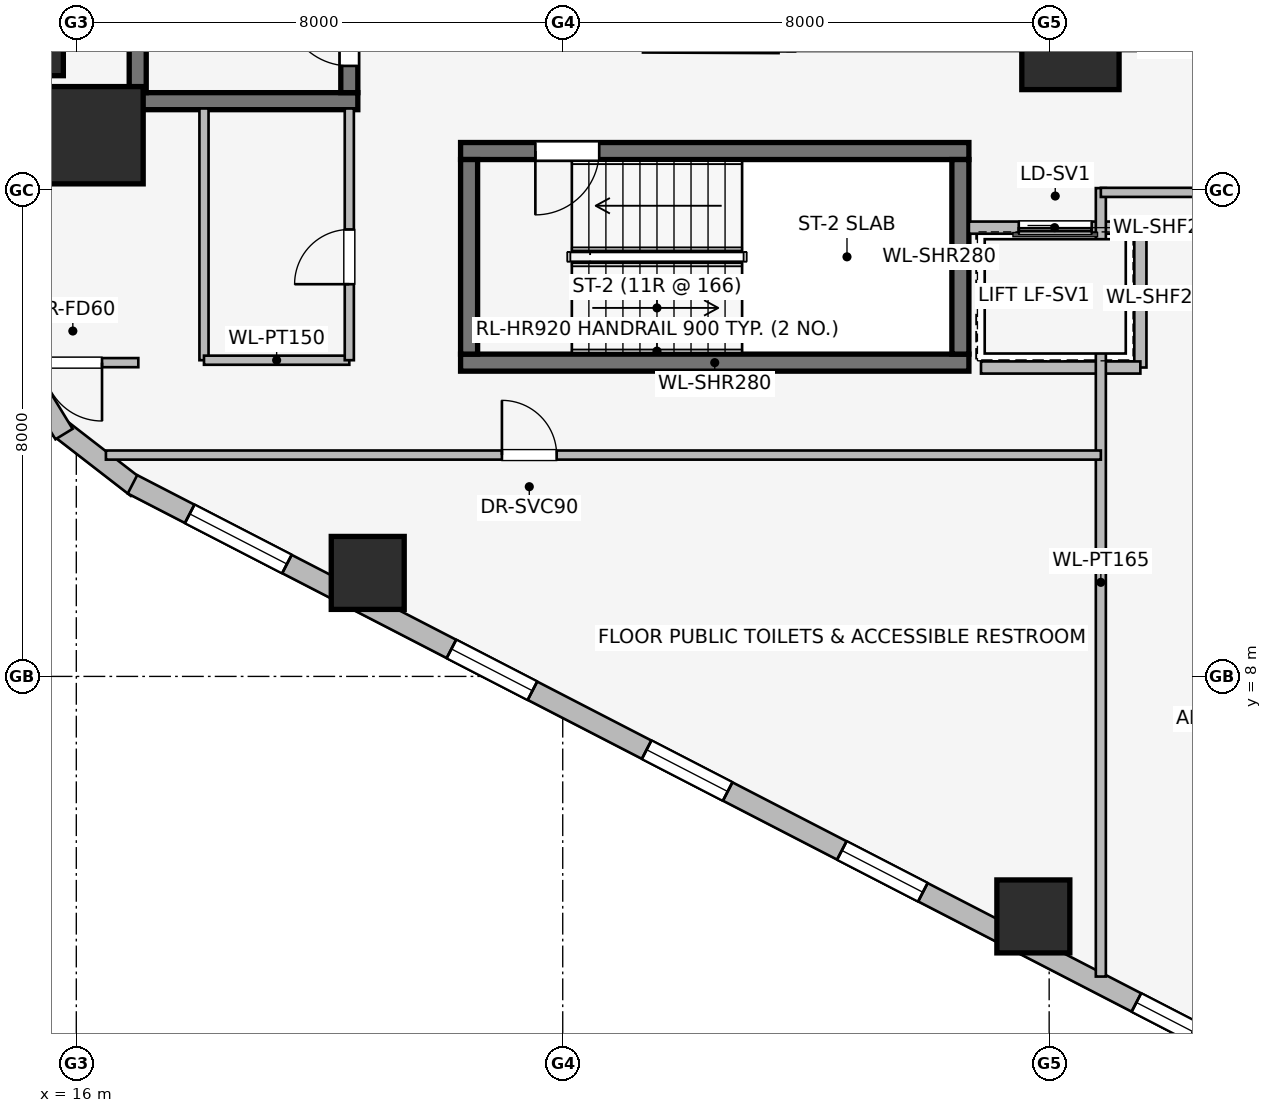
"""IFC4 building model, lengths in metres.
Left out: names, types, materials, properties, quantities, classifications, styles, units other than length and angle.
Written with IfcOpenShell. Run it as: python <this file> out.ifc"""

import sys

from ifc_helpers import new_model, si_unit, direction, frame, frame_2d, origin, origin_2d, place, context, subcontext, project, spatial, rectangle, extrude, element, fill, save


model = new_model("IFC4")
c1 = context("Model", 3, precision=1e-05, world=origin(), true_north=direction((0.0, 1.0)))
c2 = subcontext(c1, "Body", "Model", "MODEL_VIEW")
j1 = project(units=[si_unit("LENGTHUNIT", "METRE"), si_unit("PLANEANGLEUNIT", "RADIAN")], contexts=[c1])
p1 = place(None, origin())
s1 = spatial("IfcSite", under=j1, at=p1, CompositionType="ELEMENT")
p2 = place(p1, origin())
s2 = spatial("IfcBuilding", under=s1, at=p2, CompositionType="ELEMENT")
p3 = place(p2, frame((0.0, 0.0, 63.5)))
s3 = spatial("IfcBuildingStorey", under=s2, at=p3, CompositionType="ELEMENT", Elevation=63.5)
p4 = place(p3, frame((16.87, 17.46, 0.0), z_axis=(0.0, 0.0, 1.0), x_axis=(1.0, 0.0, 0.0)))
e1 = element("IfcWall", 1, at=p4, inside=s3, PredefinedType="SHEAR", context=c2, shape_type="SweptSolid", body=[
    extrude(rectangle(XDim=3.76, YDim=0.28, at=frame_2d((1.88, 0.0))), origin(), (0.0, 0.0, 1.0), 3.65),
])
p5 = place(p3, frame((17.01, 25.4, 0.0), z_axis=(0.0, 0.0, 1.0), x_axis=(0.0, -1.0, 0.0)))
e2 = element("IfcWall", 2, at=p5, inside=s3, PredefinedType="SHEAR", context=c2, shape_type="SweptSolid", body=[
    extrude(rectangle(XDim=7.8, YDim=0.28, at=frame_2d((3.9, 0.0))), origin(), (0.0, 0.0, 1.0), 3.65),
])
p6 = place(p3, frame((20.49, 17.6, 0.0), z_axis=(0.0, 0.0, 1.0), x_axis=(0.0, 1.0, 0.0)))
e3 = element("IfcWall", 3, at=p6, inside=s3, PredefinedType="SHEAR", context=c2, shape_type="SweptSolid", body=[
    extrude(rectangle(XDim=7.8, YDim=0.28, at=frame_2d((3.9, 0.0))), origin(), (0.0, 0.0, 1.0), 3.65),
])
p7 = place(p6, frame((0.44, 0.0, 0.0)))
e4 = element("IfcOpeningElement", 4, at=p7, cuts=e3, PredefinedType="OPENING", context=c2, shape_type="SweptSolid", body=[
    extrude(rectangle(XDim=1.05, YDim=2.0, at=frame_2d((0.525, 1.0))), frame((0.0, 0.15, 0.0), z_axis=(0.0, -1.0, 0.0), x_axis=(1.0, 0.0, 0.0)), (0.0, 0.0, 1.0), 0.3),
])
p8 = place(p3, frame((22.32, 13.16, 0.0), z_axis=(0.0, 0.0, 1.0), x_axis=(1.0, 0.0, 0.0)))
e5 = element("IfcWall", 5, at=p8, inside=s3, PredefinedType="SHEAR", context=c2, shape_type="SweptSolid", body=[
    extrude(rectangle(XDim=8.36, YDim=0.28, at=frame_2d((4.18, 0.0))), origin(), (0.0, 0.0, 1.0), 3.65),
])
p9 = place(p3, frame((30.68, 16.64, 0.0), z_axis=(0.0, 0.0, 1.0), x_axis=(-1.0, 0.0, 0.0)))
e6 = element("IfcWall", 6, at=p9, inside=s3, PredefinedType="SHEAR", context=c2, shape_type="SweptSolid", body=[
    extrude(rectangle(XDim=8.36, YDim=0.28, at=frame_2d((4.18, 0.0))), origin(), (0.0, 0.0, 1.0), 3.65),
])
p10 = place(p9, frame((6.08, 0.0, 0.0)))
e7 = element("IfcOpeningElement", 7, at=p10, cuts=e6, PredefinedType="OPENING", context=c2, shape_type="SweptSolid", body=[
    extrude(rectangle(XDim=1.05, YDim=2.0, at=frame_2d((0.525, 1.0))), frame((0.0, 0.15, 0.0), z_axis=(0.0, -1.0, 0.0), x_axis=(1.0, 0.0, 0.0)), (0.0, 0.0, 1.0), 0.3),
])
for number, where, z_axis, x_axis in (
    (8, (22.46, 16.5, 0.0), (0.0, 0.0, 1.0), (0.0, -1.0, 0.0)),
    (9, (30.54, 13.3, 0.0), (0.0, 0.0, 1.0), (0.0, 1.0, 0.0)),
):
    element("IfcWall", number, at=place(p3, frame(where, z_axis=z_axis, x_axis=x_axis)), inside=s3, PredefinedType="SHEAR", context=c2, shape_type="SweptSolid", body=[
        extrude(rectangle(XDim=3.2, YDim=0.28, at=frame_2d((1.6, 0.0))), origin(), (0.0, 0.0, 1.0), 3.65),
    ])
for number, where, z_axis, x_axis in (
    (10, (16.3, 16.9, 0.0), (0.0, 0.0, 1.0), (1.0, 0.0, 0.0)),
    (11, (32.35, 18.45, 0.0), (0.0, 0.0, 1.0), (1.0, 0.0, 0.0)),
):
    element("IfcColumn", number, at=place(p3, frame(where, z_axis=z_axis, x_axis=x_axis)), inside=s3, PredefinedType="COLUMN", context=c2, shape_type="SweptSolid", body=[
        extrude(rectangle(XDim=1.6, YDim=1.6, at=origin_2d()), origin(), (0.0, 0.0, 1.0), 3.65),
    ])
for number, where, z_axis, x_axis in (
    (12, (15.187, 18.479, 0.0), (0.0, 0.0, 1.0), (1.0, 0.0, 0.0)),
    (13, (20.793, 9.702, 0.0), (0.0, 0.0, 1.0), (1.0, 0.0, 0.0)),
    (14, (31.74, 4.053, 0.0), (0.0, 0.0, 1.0), (1.0, 0.0, 0.0)),
):
    element("IfcColumn", number, at=place(p3, frame(where, z_axis=z_axis, x_axis=x_axis)), inside=s3, PredefinedType="COLUMN", context=c2, shape_type="SweptSolid", body=[
        extrude(rectangle(XDim=1.2, YDim=1.2, at=origin_2d()), origin(), (0.0, 0.0, 1.0), 3.65),
    ])
p11 = place(p3, frame((16.998, 11.099, 0.0), z_axis=(0.0, 0.0, 1.0), x_axis=(-0.790691856293, 0.61221433207, 0.0)))
e15 = element("IfcWall", 15, at=p11, inside=s3, PredefinedType="STANDARD", context=c2, shape_type="SweptSolid", body=[
    extrude(rectangle(XDim=1.676, YDim=0.33, at=frame_2d((0.838, 0.0))), origin(), (0.0, 0.0, 1.0), 3.39),
])
p12 = place(p3, frame((15.798, 11.985, 0.0), z_axis=(0.0, 0.0, 1.0), x_axis=(-0.520584129191, 0.853810379671, 0.0)))
e16 = element("IfcWall", 16, at=p12, inside=s3, PredefinedType="STANDARD", context=c2, shape_type="SweptSolid", body=[
    extrude(rectangle(XDim=1.677, YDim=0.33, at=frame_2d((0.838, 0.0))), origin(), (0.0, 0.0, 1.0), 3.39),
])
p13 = place(p3, frame((35.169, 1.743, 0.0), z_axis=(0.0, 0.0, 1.0), x_axis=(-0.888634413993, 0.458616264721, 0.0)))
e17 = element("IfcWall", 17, at=p13, inside=s3, PredefinedType="STANDARD", context=c2, shape_type="SweptSolid", body=[
    extrude(rectangle(XDim=20.531, YDim=0.34, at=frame_2d((10.266, 0.0))), origin(), (0.0, 0.0, 1.0), 2.684),
])
p14 = place(p13, frame((0.902, 0.0, 0.75)))
e18 = element("IfcOpeningElement", 18, at=p14, cuts=e17, PredefinedType="OPENING", context=c2, shape_type="SweptSolid", body=[
    extrude(rectangle(XDim=1.05, YDim=1.4, at=frame_2d((0.525, 0.7))), frame((0.0, 0.18, 0.0), z_axis=(0.0, -1.0, 0.0), x_axis=(1.0, 0.0, 0.0)), (0.0, 0.0, 1.0), 0.36),
])
p15 = place(p13, frame((5.903, 0.0, 0.75)))
e19 = element("IfcOpeningElement", 19, at=p15, cuts=e17, PredefinedType="OPENING", context=c2, shape_type="SweptSolid", body=[
    extrude(rectangle(XDim=1.5, YDim=1.5, at=frame_2d((0.75, 0.75))), frame((0.0, 0.18, 0.0), z_axis=(0.0, -1.0, 0.0), x_axis=(1.0, 0.0, 0.0)), (0.0, 0.0, 1.0), 0.36),
])
p16 = place(p13, frame((9.516, 0.0, 0.75)))
e20 = element("IfcOpeningElement", 20, at=p16, cuts=e17, PredefinedType="OPENING", context=c2, shape_type="SweptSolid", body=[
    extrude(rectangle(XDim=1.5, YDim=1.5, at=frame_2d((0.75, 0.75))), frame((0.0, 0.18, 0.0), z_axis=(0.0, -1.0, 0.0), x_axis=(1.0, 0.0, 0.0)), (0.0, 0.0, 1.0), 0.36),
])
p17 = place(p13, frame((13.129, 0.0, 0.75)))
e21 = element("IfcOpeningElement", 21, at=p17, cuts=e17, PredefinedType="OPENING", context=c2, shape_type="SweptSolid", body=[
    extrude(rectangle(XDim=1.5, YDim=1.5, at=frame_2d((0.75, 0.75))), frame((0.0, 0.18, 0.0), z_axis=(0.0, -1.0, 0.0), x_axis=(1.0, 0.0, 0.0)), (0.0, 0.0, 1.0), 0.36),
])
p18 = place(p13, frame((17.673, 0.0, 0.75)))
e22 = element("IfcOpeningElement", 22, at=p18, cuts=e17, PredefinedType="OPENING", context=c2, shape_type="SweptSolid", body=[
    extrude(rectangle(XDim=1.8, YDim=1.5, at=frame_2d((0.9, 0.75))), frame((0.0, 0.18, 0.0), z_axis=(0.0, -1.0, 0.0), x_axis=(1.0, 0.0, 0.0)), (0.0, 0.0, 1.0), 0.36),
])
p19 = place(p3, frame((33.5, 15.38, 0.0), z_axis=(0.0, 0.0, 1.0), x_axis=(-1.0, 0.0, 0.0)))
e23 = element("IfcWall", 23, at=p19, inside=s3, PredefinedType="PARTITIONING", context=c2, shape_type="SweptSolid", body=[
    extrude(rectangle(XDim=2.82, YDim=0.2, at=frame_2d((1.41, 0.0))), origin(), (0.0, 0.0, 1.0), 3.39),
])
p20 = place(p19, frame((0.8, 0.0, 0.0)))
e24 = element("IfcOpeningElement", 24, at=p20, cuts=e23, PredefinedType="OPENING", context=c2, shape_type="SweptSolid", body=[
    extrude(rectangle(XDim=1.2, YDim=2.2, at=frame_2d((0.6, 1.1))), frame((0.0, 0.11, 0.0), z_axis=(0.0, -1.0, 0.0), x_axis=(1.0, 0.0, 0.0)), (0.0, 0.0, 1.0), 0.22),
])
p21 = place(p3, frame((33.5, 13.08, 0.0), z_axis=(0.0, 0.0, 1.0), x_axis=(0.0, 1.0, 0.0)))
e25 = element("IfcWall", 25, at=p21, inside=s3, PredefinedType="PARTITIONING", context=c2, shape_type="SweptSolid", body=[
    extrude(rectangle(XDim=2.3, YDim=0.2, at=frame_2d((1.15, 0.0))), origin(), (0.0, 0.0, 1.0), 3.39),
])
p22 = place(p3, frame((30.879, 13.08, 0.0), z_axis=(0.0, 0.0, 1.0), x_axis=(1.0, 0.0, 0.0)))
e26 = element("IfcWall", 26, at=p22, inside=s3, PredefinedType="PARTITIONING", context=c2, shape_type="SweptSolid", body=[
    extrude(rectangle(XDim=2.621, YDim=0.2, at=frame_2d((1.311, 0.0))), origin(), (0.0, 0.0, 1.0), 3.39),
])
p23 = place(p3, frame((25.32, 18.36, 0.0), z_axis=(0.0, 0.0, 1.0), x_axis=(0.999989925833, -0.004488678231, 0.0)))
e27 = element("IfcWall", 27, at=p23, inside=s3, PredefinedType="PARTITIONING", context=c2, shape_type="SweptSolid", body=[
    extrude(rectangle(XDim=2.23, YDim=0.2, at=frame_2d((1.115, 0.0))), origin(), (0.0, 0.0, 1.0), 3.39),
])
p24 = place(p3, frame((18.1, 17.34, 0.0), z_axis=(0.0, 0.0, 1.0), x_axis=(0.0, -1.0, 0.0)))
e28 = element("IfcWall", 28, at=p24, inside=s3, PredefinedType="PARTITIONING", context=c2, shape_type="SweptSolid", body=[
    extrude(rectangle(XDim=4.14, YDim=0.15, at=frame_2d((2.07, 0.0))), origin(), (0.0, 0.0, 1.0), 3.39),
])
p25 = place(p3, frame((18.1, 13.2, 0.0), z_axis=(0.0, 0.0, 1.0), x_axis=(1.0, 0.0, 0.0)))
e29 = element("IfcWall", 29, at=p25, inside=s3, PredefinedType="PARTITIONING", context=c2, shape_type="SweptSolid", body=[
    extrude(rectangle(XDim=2.39, YDim=0.15, at=frame_2d((1.195, 0.0))), origin(), (0.0, 0.0, 1.0), 3.39),
])
p26 = place(p3, frame((20.49, 13.2, 0.0), z_axis=(0.0, 0.0, 1.0), x_axis=(0.0, 1.0, 0.0)))
e30 = element("IfcWall", 30, at=p26, inside=s3, PredefinedType="PARTITIONING", context=c2, shape_type="SweptSolid", body=[
    extrude(rectangle(XDim=4.14, YDim=0.15, at=frame_2d((2.07, 0.0))), origin(), (0.0, 0.0, 1.0), 3.39),
])
p27 = place(p26, frame((1.25, 0.0, 0.0)))
e31 = element("IfcOpeningElement", 31, at=p27, cuts=e30, PredefinedType="OPENING", context=c2, shape_type="SweptSolid", body=[
    extrude(rectangle(XDim=0.9, YDim=2.0, at=frame_2d((0.45, 1.0))), frame((0.0, 0.085, 0.0), z_axis=(0.0, -1.0, 0.0), x_axis=(1.0, 0.0, 0.0)), (0.0, 0.0, 1.0), 0.17),
])
p28 = place(p3, frame((32.85, 3.064, 0.0), z_axis=(0.0, 0.0, 1.0), x_axis=(0.0, 1.0, 0.0)))
e32 = element("IfcWall", 32, at=p28, inside=s3, PredefinedType="PARTITIONING", context=c2, shape_type="SweptSolid", body=[
    extrude(rectangle(XDim=12.966, YDim=0.165, at=frame_2d((6.483, 0.0))), origin(), (0.0, 0.0, 1.0), 3.39),
])
p29 = place(p3, frame((16.487, 11.64, 0.0), z_axis=(0.0, 0.0, 1.0), x_axis=(1.0, 0.0, 0.0)))
e33 = element("IfcWall", 33, at=p29, inside=s3, PredefinedType="PARTITIONING", context=c2, shape_type="SweptSolid", body=[
    extrude(rectangle(XDim=16.363, YDim=0.15, at=frame_2d((8.182, 0.0))), origin(), (0.0, 0.0, 1.0), 3.39),
])
p30 = place(p29, frame((6.513, 0.0, 0.0)))
e34 = element("IfcOpeningElement", 34, at=p30, cuts=e33, PredefinedType="OPENING", context=c2, shape_type="SweptSolid", body=[
    extrude(rectangle(XDim=0.9, YDim=2.0, at=frame_2d((0.45, 1.0))), frame((0.0, 0.085, 0.0), z_axis=(0.0, -1.0, 0.0), x_axis=(1.0, 0.0, 0.0)), (0.0, 0.0, 1.0), 0.17),
])
p31 = place(p3, frame((17.02, 13.16, 0.0), z_axis=(0.0, 0.0, 1.0), x_axis=(-1.0, 0.0, 0.0)))
e35 = element("IfcWall", 35, at=p31, inside=s3, PredefinedType="PARTITIONING", context=c2, shape_type="SweptSolid", body=[
    extrude(rectangle(XDim=2.12, YDim=0.15, at=frame_2d((1.06, 0.0))), origin(), (0.0, 0.0, 1.0), 3.39),
])
p32 = place(p31, frame((0.597, 0.0, 0.0)))
e36 = element("IfcOpeningElement", 36, at=p32, cuts=e35, PredefinedType="OPENING", context=c2, shape_type="SweptSolid", body=[
    extrude(rectangle(XDim=0.96, YDim=2.0, at=frame_2d((0.48, 1.0))), frame((0.0, 0.085, 0.0), z_axis=(0.0, -1.0, 0.0), x_axis=(1.0, 0.0, 0.0)), (0.0, 0.0, 1.0), 0.17),
])
p33 = place(p3, frame((32.85, 15.96, 0.0), z_axis=(0.0, 0.0, 1.0), x_axis=(1.0, 0.0, 0.0)))
e37 = element("IfcWall", 37, at=p33, inside=s3, PredefinedType="PARTITIONING", context=c2, shape_type="SweptSolid", body=[
    extrude(rectangle(XDim=6.542, YDim=0.15, at=frame_2d((3.271, 0.0))), origin(), (0.0, 0.0, 1.0), 3.39),
])
p34 = place(p33, frame((2.791, 0.0, 0.0)))
e38 = element("IfcOpeningElement", 38, at=p34, cuts=e37, PredefinedType="OPENING", context=c2, shape_type="SweptSolid", body=[
    extrude(rectangle(XDim=0.96, YDim=2.0, at=frame_2d((0.48, 1.0))), frame((0.0, 0.085, 0.0), z_axis=(0.0, -1.0, 0.0), x_axis=(1.0, 0.0, 0.0)), (0.0, 0.0, 1.0), 0.17),
])
p35 = place(p14, origin())
e39 = element("IfcWindow", 39, at=p35, inside=s3, PartitioningType="SINGLE_PANEL", PredefinedType="WINDOW", context=c2, shape_type="SweptSolid", body=[
    extrude(rectangle(XDim=1.05, YDim=1.4, at=frame_2d((0.525, 0.7))), frame((0.0, 0.03, 0.0), z_axis=(0.0, -1.0, 0.0), x_axis=(1.0, 0.0, 0.0)), (0.0, 0.0, 1.0), 0.06),
])
fill(e18, e39)
p36 = place(p15, origin())
e40 = element("IfcWindow", 40, at=p36, inside=s3, PartitioningType="SINGLE_PANEL", PredefinedType="WINDOW", context=c2, shape_type="SweptSolid", body=[
    extrude(rectangle(XDim=1.5, YDim=1.5, at=frame_2d((0.75, 0.75))), frame((0.0, 0.03, 0.0), z_axis=(0.0, -1.0, 0.0), x_axis=(1.0, 0.0, 0.0)), (0.0, 0.0, 1.0), 0.06),
])
fill(e19, e40)
p37 = place(p16, origin())
e41 = element("IfcWindow", 41, at=p37, inside=s3, PartitioningType="SINGLE_PANEL", PredefinedType="WINDOW", context=c2, shape_type="SweptSolid", body=[
    extrude(rectangle(XDim=1.5, YDim=1.5, at=frame_2d((0.75, 0.75))), frame((0.0, 0.03, 0.0), z_axis=(0.0, -1.0, 0.0), x_axis=(1.0, 0.0, 0.0)), (0.0, 0.0, 1.0), 0.06),
])
fill(e20, e41)
p38 = place(p17, origin())
e42 = element("IfcWindow", 42, at=p38, inside=s3, PartitioningType="SINGLE_PANEL", PredefinedType="WINDOW", context=c2, shape_type="SweptSolid", body=[
    extrude(rectangle(XDim=1.5, YDim=1.5, at=frame_2d((0.75, 0.75))), frame((0.0, 0.03, 0.0), z_axis=(0.0, -1.0, 0.0), x_axis=(1.0, 0.0, 0.0)), (0.0, 0.0, 1.0), 0.06),
])
fill(e21, e42)
p39 = place(p18, origin())
e43 = element("IfcWindow", 43, at=p39, inside=s3, PartitioningType="SINGLE_PANEL", PredefinedType="WINDOW", context=c2, shape_type="SweptSolid", body=[
    extrude(rectangle(XDim=1.8, YDim=1.5, at=frame_2d((0.9, 0.75))), frame((0.0, 0.03, 0.0), z_axis=(0.0, -1.0, 0.0), x_axis=(1.0, 0.0, 0.0)), (0.0, 0.0, 1.0), 0.06),
])
fill(e22, e43)
p40 = place(p7, origin())
e44 = element("IfcDoor", 44, at=p40, inside=s3, OperationType="SINGLE_SWING_RIGHT", PredefinedType="DOOR", context=c2, shape_type="SweptSolid", body=[
    extrude(rectangle(XDim=1.05, YDim=2.0, at=frame_2d((0.525, 1.0))), frame((0.0, 0.025, 0.0), z_axis=(0.0, -1.0, 0.0), x_axis=(1.0, 0.0, 0.0)), (0.0, 0.0, 1.0), 0.05),
])
fill(e4, e44)
p41 = place(p10, origin())
e45 = element("IfcDoor", 45, at=p41, inside=s3, OperationType="SINGLE_SWING_RIGHT", PredefinedType="DOOR", context=c2, shape_type="SweptSolid", body=[
    extrude(rectangle(XDim=1.05, YDim=2.0, at=frame_2d((0.525, 1.0))), frame((0.0, 0.025, 0.0), z_axis=(0.0, -1.0, 0.0), x_axis=(1.0, 0.0, 0.0)), (0.0, 0.0, 1.0), 0.05),
])
fill(e7, e45)
p42 = place(p20, origin())
e46 = element("IfcDoor", 46, at=p42, inside=s3, OperationType="SLIDING_TO_RIGHT", PredefinedType="DOOR", context=c2, shape_type="SweptSolid", body=[
    extrude(rectangle(XDim=1.2, YDim=2.2, at=frame_2d((0.6, 1.1))), frame((0.0, 0.025, 0.0), z_axis=(0.0, -1.0, 0.0), x_axis=(1.0, 0.0, 0.0)), (0.0, 0.0, 1.0), 0.05),
])
fill(e24, e46)
p43 = place(p27, origin())
e47 = element("IfcDoor", 47, at=p43, inside=s3, OperationType="SINGLE_SWING_LEFT", PredefinedType="DOOR", context=c2, shape_type="SweptSolid", body=[
    extrude(rectangle(XDim=0.9, YDim=2.0, at=frame_2d((0.45, 1.0))), frame((0.0, 0.025, 0.0), z_axis=(0.0, -1.0, 0.0), x_axis=(1.0, 0.0, 0.0)), (0.0, 0.0, 1.0), 0.05),
])
fill(e31, e47)
p44 = place(p30, origin())
e48 = element("IfcDoor", 48, at=p44, inside=s3, OperationType="SINGLE_SWING_LEFT", PredefinedType="DOOR", context=c2, shape_type="SweptSolid", body=[
    extrude(rectangle(XDim=0.9, YDim=2.0, at=frame_2d((0.45, 1.0))), frame((0.0, 0.025, 0.0), z_axis=(0.0, -1.0, 0.0), x_axis=(1.0, 0.0, 0.0)), (0.0, 0.0, 1.0), 0.05),
])
fill(e34, e48)
p45 = place(p32, origin())
e49 = element("IfcDoor", 49, at=p45, inside=s3, OperationType="SINGLE_SWING_LEFT", PredefinedType="DOOR", context=c2, shape_type="SweptSolid", body=[
    extrude(rectangle(XDim=0.96, YDim=2.0, at=frame_2d((0.48, 1.0))), frame((0.0, 0.025, 0.0), z_axis=(0.0, -1.0, 0.0), x_axis=(1.0, 0.0, 0.0)), (0.0, 0.0, 1.0), 0.05),
])
fill(e36, e49)
save(model, sys.argv[1])
